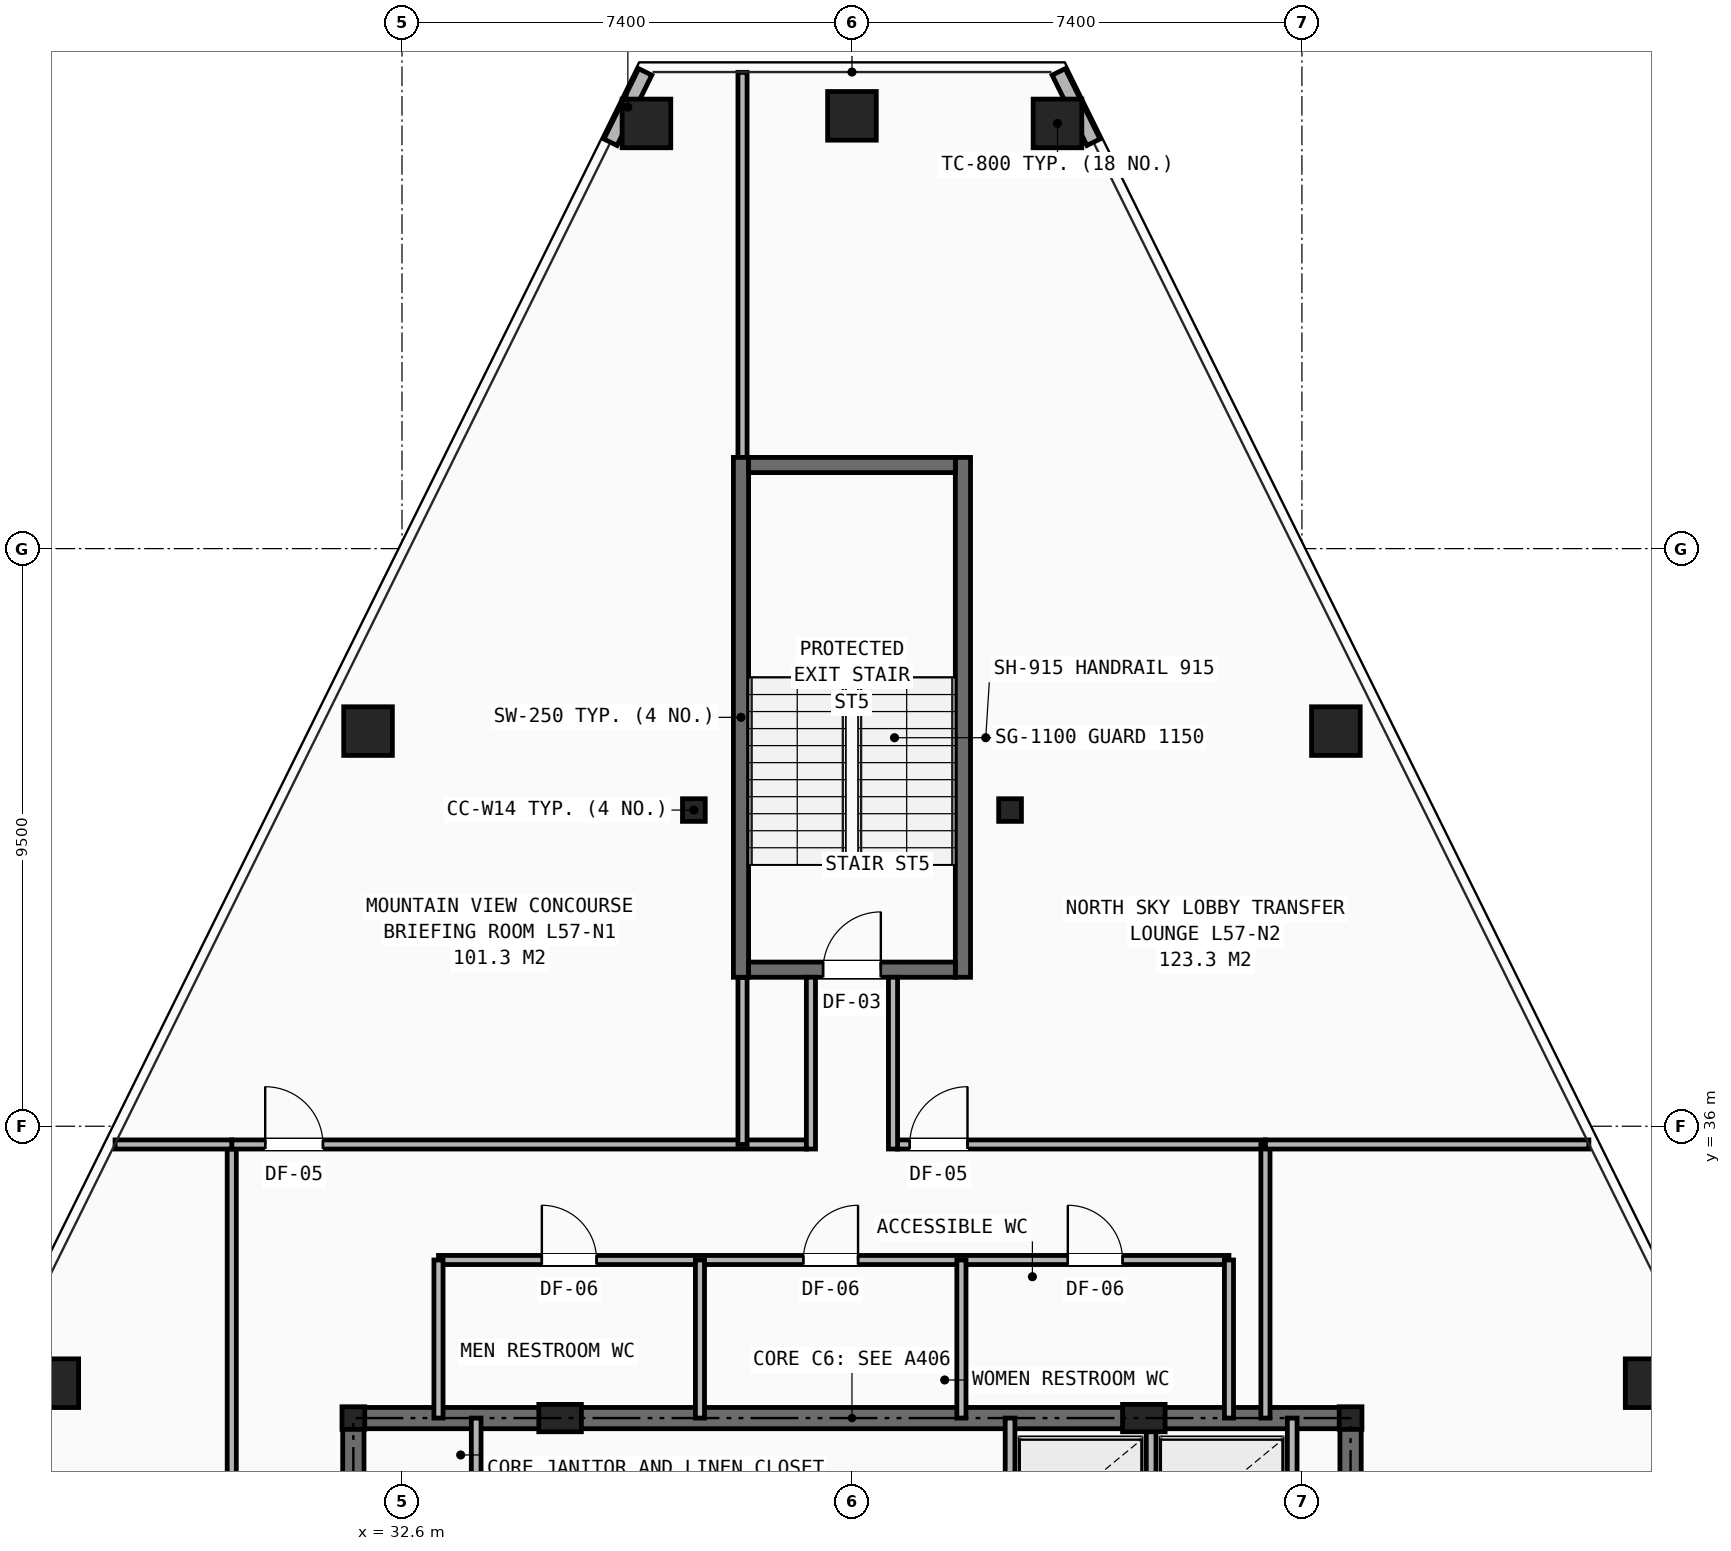
"""IFC4 building model, lengths in metres.
Left out: names, types, materials, properties, quantities, classifications, styles, units other than length and angle.
Written with IfcOpenShell. Run it as: python <this file> out.ifc"""

import sys

from ifc_helpers import new_model, si_unit, direction, frame, frame_2d, origin, origin_2d, place, context, subcontext, project, spatial, rectangle, hollow_rectangle, i_section, extrude, element, fill, save


model = new_model("IFC4")
c1 = context("Model", 3, precision=1e-05, world=origin(), true_north=direction((0.0, 1.0)))
c2 = subcontext(c1, "Body", "Model", "MODEL_VIEW")
j1 = project(units=[si_unit("LENGTHUNIT", "METRE"), si_unit("PLANEANGLEUNIT", "RADIAN")], contexts=[c1])
p1 = place(None, origin())
s1 = spatial("IfcSite", under=j1, at=p1, CompositionType="ELEMENT")
p2 = place(p1, origin())
s2 = spatial("IfcBuilding", under=s1, at=p2, CompositionType="ELEMENT")
p3 = place(p2, frame((0.0, 0.0, 200.7)))
s3 = spatial("IfcBuildingStorey", under=s2, at=p3, CompositionType="ELEMENT", Elevation=200.7)
for number, where, z_axis, x_axis in (
    (1, (31.8, 31.2, 0.0), (0.0, 0.0, 1.0), (1.0, 0.0, 0.0)),
    (2, (48.2, 31.2, 0.0), (0.0, 0.0, 1.0), (1.0, 0.0, 0.0)),
    (3, (37.4, 41.2, 0.0), (0.0, 0.0, 1.0), (1.0, 0.0, 0.0)),
    (4, (42.6, 41.2, 0.0), (0.0, 0.0, 1.0), (1.0, 0.0, 0.0)),
):
    element("IfcColumn", number, at=place(p3, frame(where, z_axis=z_axis, x_axis=x_axis)), inside=s3, PredefinedType="COLUMN", context=c2, shape_type="SweptSolid", body=[
        extrude(i_section(OverallWidth=0.374, OverallDepth=0.372, WebThickness=0.016, FlangeThickness=0.026, at=origin_2d()), origin(), (0.0, 0.0, 1.0), 4.2),
    ])
for number, where, z_axis, x_axis in (
    (5, (35.2, 31.2, 0.0), (0.0, 0.0, 1.0), (1.0, 0.0, 0.0)),
    (6, (44.8, 31.2, 0.0), (0.0, 0.0, 1.0), (1.0, 0.0, 0.0)),
):
    element("IfcColumn", number, at=place(p3, frame(where, z_axis=z_axis, x_axis=x_axis)), inside=s3, PredefinedType="PILASTER", context=c2, shape_type="SweptSolid", body=[
        extrude(rectangle(XDim=0.7, YDim=0.45, at=origin_2d()), origin(), (0.0, 0.0, 1.0), 4.2),
    ])
for number, where, z_axis, x_axis in (
    (7, (43.38, 52.493, 0.0), (0.0, 0.0, 1.0), (1.0, 0.0, 0.0)),
    (8, (40.0, 52.618, 0.0), (0.0, 0.0, 1.0), (1.0, 0.0, 0.0)),
    (9, (36.62, 52.493, 0.0), (0.0, 0.0, 1.0), (1.0, 0.0, 0.0)),
    (10, (32.042, 42.499, 0.0), (0.0, 0.0, 1.0), (1.0, 0.0, 0.0)),
    (11, (26.882, 31.774, 0.0), (0.0, 0.0, 1.0), (1.0, 0.0, 0.0)),
    (12, (53.118, 31.774, 0.0), (0.0, 0.0, 1.0), (1.0, 0.0, 0.0)),
    (13, (47.958, 42.499, 0.0), (0.0, 0.0, 1.0), (1.0, 0.0, 0.0)),
):
    element("IfcColumn", number, at=place(p3, frame(where, z_axis=z_axis, x_axis=x_axis)), inside=s3, PredefinedType="COLUMN", context=c2, shape_type="SweptSolid", body=[
        extrude(hollow_rectangle(XDim=0.8, YDim=0.8, WallThickness=0.055, at=origin_2d()), origin(), (0.0, 0.0, 1.0), 4.2),
    ])
for number, where, z_axis, x_axis in (
    (14, (36.6, 53.34, 0.0), (0.0, 0.0, 1.0), (-0.443, -0.896, 0.0)),
    (15, (43.972, 52.183, 0.0), (0.0, 0.0, 1.0), (-0.443, 0.896, 0.0)),
):
    element("IfcWall", number, at=place(p3, frame(where, z_axis=z_axis, x_axis=x_axis)), inside=s3, PredefinedType="SHEAR", context=c2, shape_type="SweptSolid", body=[
        extrude(rectangle(XDim=1.291, YDim=0.24, at=frame_2d((0.646, 0.0))), origin(), (0.0, 0.0, 1.0), 3.323),
    ])
p4 = place(p3, frame((31.8, 31.2, 0.0), z_axis=(0.0, 0.0, 1.0), x_axis=(1.0, 0.0, 0.0)))
e16 = element("IfcWall", 16, at=p4, inside=s3, PredefinedType="SHEAR", context=c2, shape_type="SweptSolid", body=[
    extrude(rectangle(XDim=16.4, YDim=0.35, at=frame_2d((8.2, 0.0))), origin(), (0.0, 0.0, 1.0), 3.95),
])
p5 = place(p3, frame((31.8, 16.4, 0.0), z_axis=(0.0, 0.0, 1.0), x_axis=(0.0, 1.0, 0.0)))
e17 = element("IfcWall", 17, at=p5, inside=s3, PredefinedType="SHEAR", context=c2, shape_type="SweptSolid", body=[
    extrude(rectangle(XDim=14.8, YDim=0.35, at=frame_2d((7.4, 0.0))), origin(), (0.0, 0.0, 1.0), 3.95),
])
p6 = place(p5, frame((11.0, 0.0, 0.0)))
e18 = element("IfcOpeningElement", 18, at=p6, cuts=e17, PredefinedType="OPENING", context=c2, shape_type="SweptSolid", body=[
    extrude(rectangle(XDim=1.1, YDim=2.15, at=frame_2d((0.55, 1.075))), frame((0.0, 0.185, 0.0), z_axis=(0.0, -1.0, 0.0), x_axis=(1.0, 0.0, 0.0)), (0.0, 0.0, 1.0), 0.37),
])
p7 = place(p3, frame((48.2, 16.4, 0.0), z_axis=(0.0, 0.0, 1.0), x_axis=(0.0, 1.0, 0.0)))
e19 = element("IfcWall", 19, at=p7, inside=s3, PredefinedType="SHEAR", context=c2, shape_type="SweptSolid", body=[
    extrude(rectangle(XDim=14.8, YDim=0.35, at=frame_2d((7.4, 0.0))), origin(), (0.0, 0.0, 1.0), 3.95),
])
p8 = place(p7, frame((11.0, 0.0, 0.0)))
e20 = element("IfcOpeningElement", 20, at=p8, cuts=e19, PredefinedType="OPENING", context=c2, shape_type="SweptSolid", body=[
    extrude(rectangle(XDim=1.1, YDim=2.15, at=frame_2d((0.55, 1.075))), frame((0.0, 0.185, 0.0), z_axis=(0.0, -1.0, 0.0), x_axis=(1.0, 0.0, 0.0)), (0.0, 0.0, 1.0), 0.37),
])
for number, where, z_axis, x_axis in (
    (21, (33.82, 29.02, 0.0), (0.0, 0.0, 1.0), (0.0, 1.0, 0.0)),
    (22, (42.6, 29.02, 0.0), (0.0, 0.0, 1.0), (0.0, 1.0, 0.0)),
    (23, (44.92, 29.02, 0.0), (0.0, 0.0, 1.0), (0.0, 1.0, 0.0)),
    (24, (47.24, 29.02, 0.0), (0.0, 0.0, 1.0), (0.0, 1.0, 0.0)),
):
    element("IfcWall", number, at=place(p3, frame(where, z_axis=z_axis, x_axis=x_axis)), inside=s3, PredefinedType="SOLIDWALL", context=c2, shape_type="SweptSolid", body=[
        extrude(rectangle(XDim=2.18, YDim=0.16, at=frame_2d((1.09, 0.0))), origin(), (0.0, 0.0, 1.0), 3.405),
    ])
p9 = place(p3, frame((33.2, 33.8, 0.0), z_axis=(0.0, 0.0, 1.0), x_axis=(1.0, 0.0, 0.0)))
e25 = element("IfcWall", 25, at=p9, inside=s3, PredefinedType="PARTITIONING", context=c2, shape_type="SweptSolid", body=[
    extrude(rectangle(XDim=13.0, YDim=0.15, at=frame_2d((6.5, 0.0))), origin(), (0.0, 0.0, 1.0), 3.95),
])
p10 = place(p9, frame((1.7, 0.0, 0.0)))
e26 = element("IfcOpeningElement", 26, at=p10, cuts=e25, PredefinedType="OPENING", context=c2, shape_type="SweptSolid", body=[
    extrude(rectangle(XDim=0.9, YDim=2.1, at=frame_2d((0.45, 1.05))), frame((0.0, 0.085, 0.0), z_axis=(0.0, -1.0, 0.0), x_axis=(1.0, 0.0, 0.0)), (0.0, 0.0, 1.0), 0.17),
])
p11 = place(p9, frame((6.0, 0.0, 0.0)))
e27 = element("IfcOpeningElement", 27, at=p11, cuts=e25, PredefinedType="OPENING", context=c2, shape_type="SweptSolid", body=[
    extrude(rectangle(XDim=0.9, YDim=2.1, at=frame_2d((0.45, 1.05))), frame((0.0, 0.085, 0.0), z_axis=(0.0, -1.0, 0.0), x_axis=(1.0, 0.0, 0.0)), (0.0, 0.0, 1.0), 0.17),
])
p12 = place(p9, frame((10.35, 0.0, 0.0)))
e28 = element("IfcOpeningElement", 28, at=p12, cuts=e25, PredefinedType="OPENING", context=c2, shape_type="SweptSolid", body=[
    extrude(rectangle(XDim=0.9, YDim=2.1, at=frame_2d((0.45, 1.05))), frame((0.0, 0.085, 0.0), z_axis=(0.0, -1.0, 0.0), x_axis=(1.0, 0.0, 0.0)), (0.0, 0.0, 1.0), 0.17),
])
for number, where, z_axis, x_axis in (
    (29, (33.2, 31.2, 0.0), (0.0, 0.0, 1.0), (0.0, 1.0, 0.0)),
    (30, (46.2, 31.2, 0.0), (0.0, 0.0, 1.0), (0.0, 1.0, 0.0)),
    (31, (37.5, 31.2, 0.0), (0.0, 0.0, 1.0), (0.0, 1.0, 0.0)),
    (32, (41.8, 31.2, 0.0), (0.0, 0.0, 1.0), (0.0, 1.0, 0.0)),
):
    element("IfcWall", number, at=place(p3, frame(where, z_axis=z_axis, x_axis=x_axis)), inside=s3, PredefinedType="PARTITIONING", context=c2, shape_type="SweptSolid", body=[
        extrude(rectangle(XDim=2.6, YDim=0.15, at=frame_2d((1.3, 0.0))), origin(), (0.0, 0.0, 1.0), 3.405),
    ])
p13 = place(p3, frame((29.8, 16.4, 0.0), z_axis=(0.0, 0.0, 1.0), x_axis=(0.0, 1.0, 0.0)))
e33 = element("IfcWall", 33, at=p13, inside=s3, PredefinedType="PARTITIONING", context=c2, shape_type="SweptSolid", body=[
    extrude(rectangle(XDim=19.3, YDim=0.15, at=frame_2d((9.65, 0.0))), origin(), (0.0, 0.0, 1.0), 2.965),
])
p14 = place(p13, frame((0.35, 0.0, 0.0)))
e34 = element("IfcOpeningElement", 34, at=p14, cuts=e33, PredefinedType="OPENING", context=c2, shape_type="SweptSolid", body=[
    extrude(rectangle(XDim=0.95, YDim=2.1, at=frame_2d((0.475, 1.05))), frame((0.0, 0.085, 0.0), z_axis=(0.0, -1.0, 0.0), x_axis=(1.0, 0.0, 0.0)), (0.0, 0.0, 1.0), 0.17),
])
p15 = place(p13, frame((5.95, 0.0, 0.0)))
e35 = element("IfcOpeningElement", 35, at=p15, cuts=e33, PredefinedType="OPENING", context=c2, shape_type="SweptSolid", body=[
    extrude(rectangle(XDim=0.95, YDim=2.1, at=frame_2d((0.475, 1.05))), frame((0.0, 0.085, 0.0), z_axis=(0.0, -1.0, 0.0), x_axis=(1.0, 0.0, 0.0)), (0.0, 0.0, 1.0), 0.17),
])
p16 = place(p13, frame((12.95, 0.0, 0.0)))
e36 = element("IfcOpeningElement", 36, at=p16, cuts=e33, PredefinedType="OPENING", context=c2, shape_type="SweptSolid", body=[
    extrude(rectangle(XDim=0.95, YDim=2.1, at=frame_2d((0.475, 1.05))), frame((0.0, 0.085, 0.0), z_axis=(0.0, -1.0, 0.0), x_axis=(1.0, 0.0, 0.0)), (0.0, 0.0, 1.0), 0.17),
])
p17 = place(p3, frame((29.8, 35.7, 0.0), z_axis=(0.0, 0.0, 1.0), x_axis=(1.0, 0.0, 0.0)))
e37 = element("IfcWall", 37, at=p17, inside=s3, PredefinedType="PARTITIONING", context=c2, shape_type="SweptSolid", body=[
    extrude(rectangle(XDim=9.45, YDim=0.15, at=frame_2d((4.725, 0.0))), origin(), (0.0, 0.0, 1.0), 3.533),
])
p18 = place(p17, frame((0.55, 0.0, 0.0)))
e38 = element("IfcOpeningElement", 38, at=p18, cuts=e37, PredefinedType="OPENING", context=c2, shape_type="SweptSolid", body=[
    extrude(rectangle(XDim=0.95, YDim=2.1, at=frame_2d((0.475, 1.05))), frame((0.0, 0.085, 0.0), z_axis=(0.0, -1.0, 0.0), x_axis=(1.0, 0.0, 0.0)), (0.0, 0.0, 1.0), 0.17),
])
p19 = place(p3, frame((40.75, 35.7, 0.0), z_axis=(0.0, 0.0, 1.0), x_axis=(1.0, 0.0, 0.0)))
e39 = element("IfcWall", 39, at=p19, inside=s3, PredefinedType="PARTITIONING", context=c2, shape_type="SweptSolid", body=[
    extrude(rectangle(XDim=6.05, YDim=0.15, at=frame_2d((3.025, 0.0))), origin(), (0.0, 0.0, 1.0), 3.95),
])
p20 = place(p19, frame((0.2, 0.0, 0.0)))
e40 = element("IfcOpeningElement", 40, at=p20, cuts=e39, PredefinedType="OPENING", context=c2, shape_type="SweptSolid", body=[
    extrude(rectangle(XDim=0.95, YDim=2.1, at=frame_2d((0.475, 1.05))), frame((0.0, 0.085, 0.0), z_axis=(0.0, -1.0, 0.0), x_axis=(1.0, 0.0, 0.0)), (0.0, 0.0, 1.0), 0.17),
])
p21 = place(p3, frame((46.8, 31.2, 0.0), z_axis=(0.0, 0.0, 1.0), x_axis=(0.0, 1.0, 0.0)))
e41 = element("IfcWall", 41, at=p21, inside=s3, PredefinedType="PARTITIONING", context=c2, shape_type="SweptSolid", body=[
    extrude(rectangle(XDim=4.5, YDim=0.15, at=frame_2d((2.25, 0.0))), origin(), (0.0, 0.0, 1.0), 3.405),
])
p22 = place(p3, frame((27.881, 35.7, 0.0), z_axis=(0.0, 0.0, 1.0), x_axis=(1.0, 0.0, 0.0)))
e42 = element("IfcWall", 42, at=p22, inside=s3, PredefinedType="PARTITIONING", context=c2, shape_type="SweptSolid", body=[
    extrude(rectangle(XDim=1.919, YDim=0.15, at=frame_2d((0.959, 0.0))), origin(), (0.0, 0.0, 1.0), 3.329),
])
p23 = place(p3, frame((46.8, 35.7, 0.0), z_axis=(0.0, 0.0, 1.0), x_axis=(1.0, 0.0, 0.0)))
e43 = element("IfcWall", 43, at=p23, inside=s3, PredefinedType="PARTITIONING", context=c2, shape_type="SweptSolid", body=[
    extrude(rectangle(XDim=5.319, YDim=0.15, at=frame_2d((2.659, 0.0))), origin(), (0.0, 0.0, 1.0), 3.329),
])
p24 = place(p3, frame((38.2, 35.7, 0.0), z_axis=(0.0, 0.0, 1.0), x_axis=(0.0, 1.0, 0.0)))
e44 = element("IfcWall", 44, at=p24, inside=s3, PredefinedType="PARTITIONING", context=c2, shape_type="SweptSolid", body=[
    extrude(rectangle(XDim=2.75, YDim=0.15, at=frame_2d((1.375, 0.0))), origin(), (0.0, 0.0, 1.0), 3.95),
])
p25 = place(p3, frame((38.2, 47.0, 0.0), z_axis=(0.0, 0.0, 1.0), x_axis=(0.0, 1.0, 0.0)))
e45 = element("IfcWall", 45, at=p25, inside=s3, PredefinedType="PARTITIONING", context=c2, shape_type="SweptSolid", body=[
    extrude(rectangle(XDim=6.333, YDim=0.15, at=frame_2d((3.167, 0.0))), origin(), (0.0, 0.0, 1.0), 3.329),
])
for number, where, z_axis, x_axis in (
    (46, (38.175, 38.45, 0.0), (0.0, 0.0, 1.0), (0.0, 1.0, 0.0)),
    (47, (41.825, 38.45, 0.0), (0.0, 0.0, 1.0), (0.0, 1.0, 0.0)),
):
    element("IfcWall", number, at=place(p3, frame(where, z_axis=z_axis, x_axis=x_axis)), inside=s3, PredefinedType="SHEAR", context=c2, shape_type="SweptSolid", body=[
        extrude(rectangle(XDim=8.55, YDim=0.25, at=frame_2d((4.275, 0.0))), origin(), (0.0, 0.0, 1.0), 3.95),
    ])
p26 = place(p3, frame((38.3, 38.575, 0.0), z_axis=(0.0, 0.0, 1.0), x_axis=(1.0, 0.0, 0.0)))
e48 = element("IfcWall", 48, at=p26, inside=s3, PredefinedType="SHEAR", context=c2, shape_type="SweptSolid", body=[
    extrude(rectangle(XDim=3.4, YDim=0.25, at=frame_2d((1.7, 0.0))), origin(), (0.0, 0.0, 1.0), 3.95),
])
p27 = place(p26, frame((1.225, 0.0, 0.0)))
e49 = element("IfcOpeningElement", 49, at=p27, cuts=e48, PredefinedType="OPENING", context=c2, shape_type="SweptSolid", body=[
    extrude(rectangle(XDim=0.95, YDim=2.1, at=frame_2d((0.475, 1.05))), frame((0.0, 0.135, 0.0), z_axis=(0.0, -1.0, 0.0), x_axis=(1.0, 0.0, 0.0)), (0.0, 0.0, 1.0), 0.27),
])
p28 = place(p3, frame((38.3, 46.875, 0.0), z_axis=(0.0, 0.0, 1.0), x_axis=(1.0, 0.0, 0.0)))
e50 = element("IfcWall", 50, at=p28, inside=s3, PredefinedType="SHEAR", context=c2, shape_type="SweptSolid", body=[
    extrude(rectangle(XDim=3.4, YDim=0.25, at=frame_2d((1.7, 0.0))), origin(), (0.0, 0.0, 1.0), 3.95),
])
for number, where, z_axis, x_axis in (
    (51, (39.325, 35.625, 0.0), (0.0, 0.0, 1.0), (0.0, 1.0, 0.0)),
    (52, (40.675, 35.625, 0.0), (0.0, 0.0, 1.0), (0.0, 1.0, 0.0)),
):
    element("IfcWall", number, at=place(p3, frame(where, z_axis=z_axis, x_axis=x_axis)), inside=s3, PredefinedType="PARTITIONING", context=c2, shape_type="SweptSolid", body=[
        extrude(rectangle(XDim=2.825, YDim=0.15, at=frame_2d((1.413, 0.0))), origin(), (0.0, 0.0, 1.0), 3.95),
    ])
p29 = place(p10, origin())
e53 = element("IfcDoor", 53, at=p29, inside=s3, OperationType="SINGLE_SWING_LEFT", PredefinedType="DOOR", context=c2, shape_type="SweptSolid", body=[
    extrude(rectangle(XDim=0.9, YDim=2.1, at=frame_2d((0.45, 1.05))), frame((0.0, 0.025, 0.0), z_axis=(0.0, -1.0, 0.0), x_axis=(1.0, 0.0, 0.0)), (0.0, 0.0, 1.0), 0.05),
])
fill(e26, e53)
p30 = place(p11, origin())
e54 = element("IfcDoor", 54, at=p30, inside=s3, OperationType="SINGLE_SWING_RIGHT", PredefinedType="DOOR", context=c2, shape_type="SweptSolid", body=[
    extrude(rectangle(XDim=0.9, YDim=2.1, at=frame_2d((0.45, 1.05))), frame((0.0, 0.025, 0.0), z_axis=(0.0, -1.0, 0.0), x_axis=(1.0, 0.0, 0.0)), (0.0, 0.0, 1.0), 0.05),
])
fill(e27, e54)
p31 = place(p12, origin())
e55 = element("IfcDoor", 55, at=p31, inside=s3, OperationType="SINGLE_SWING_LEFT", PredefinedType="DOOR", context=c2, shape_type="SweptSolid", body=[
    extrude(rectangle(XDim=0.9, YDim=2.1, at=frame_2d((0.45, 1.05))), frame((0.0, 0.025, 0.0), z_axis=(0.0, -1.0, 0.0), x_axis=(1.0, 0.0, 0.0)), (0.0, 0.0, 1.0), 0.05),
])
fill(e28, e55)
p32 = place(p18, origin())
e56 = element("IfcDoor", 56, at=p32, inside=s3, OperationType="SINGLE_SWING_LEFT", PredefinedType="DOOR", context=c2, shape_type="SweptSolid", body=[
    extrude(rectangle(XDim=0.95, YDim=2.1, at=frame_2d((0.475, 1.05))), frame((0.0, 0.025, 0.0), z_axis=(0.0, -1.0, 0.0), x_axis=(1.0, 0.0, 0.0)), (0.0, 0.0, 1.0), 0.05),
])
fill(e38, e56)
p33 = place(p20, origin())
e57 = element("IfcDoor", 57, at=p33, inside=s3, OperationType="SINGLE_SWING_RIGHT", PredefinedType="DOOR", context=c2, shape_type="SweptSolid", body=[
    extrude(rectangle(XDim=0.95, YDim=2.1, at=frame_2d((0.475, 1.05))), frame((0.0, 0.025, 0.0), z_axis=(0.0, -1.0, 0.0), x_axis=(1.0, 0.0, 0.0)), (0.0, 0.0, 1.0), 0.05),
])
fill(e40, e57)
p34 = place(p27, origin())
e58 = element("IfcDoor", 58, at=p34, inside=s3, OperationType="SINGLE_SWING_RIGHT", PredefinedType="DOOR", context=c2, shape_type="SweptSolid", body=[
    extrude(rectangle(XDim=0.95, YDim=2.1, at=frame_2d((0.475, 1.05))), frame((0.0, 0.025, 0.0), z_axis=(0.0, -1.0, 0.0), x_axis=(1.0, 0.0, 0.0)), (0.0, 0.0, 1.0), 0.05),
])
fill(e49, e58)
save(model, sys.argv[1])
